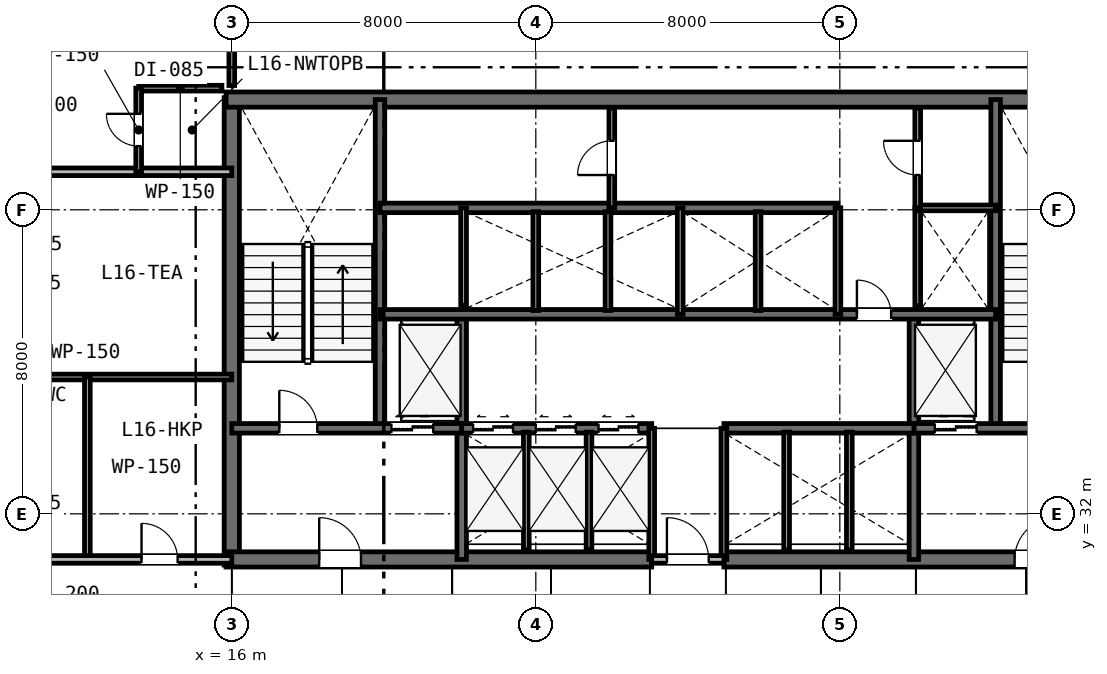
"""IFC4 building model, lengths in metres.
Left out: names, types, materials, properties, quantities, classifications, styles, units other than length and angle.
Written with IfcOpenShell. Run it as: python <this file> out.ifc"""

import sys

from ifc_helpers import new_model, si_unit, direction, frame, frame_2d, origin, place, context, subcontext, project, spatial, rectangle, extrude, element, fill, save


model = new_model("IFC4")
c1 = context("Model", 3, precision=1e-05, world=origin(), true_north=direction((0.0, 1.0)))
c2 = subcontext(c1, "Body", "Model", "MODEL_VIEW")
j1 = project(units=[si_unit("LENGTHUNIT", "METRE"), si_unit("PLANEANGLEUNIT", "RADIAN")], contexts=[c1])
p1 = place(None, origin())
s1 = spatial("IfcSite", under=j1, at=p1, CompositionType="ELEMENT")
p2 = place(p1, origin())
s2 = spatial("IfcBuilding", under=s1, at=p2, CompositionType="ELEMENT")
p3 = place(p2, frame((0.0, 0.0, 65.4)))
s3 = spatial("IfcBuildingStorey", under=s2, at=p3, CompositionType="ELEMENT", Elevation=65.4)
p4 = place(p3, frame((16.0, 30.65, 0.0), z_axis=(0.0, 0.0, 1.0), x_axis=(0.0, 1.0, 0.0)))
e1 = element("IfcWall", 1, at=p4, inside=s3, PredefinedType="SHEAR", context=c2, shape_type="SweptSolid", body=[
    extrude(rectangle(XDim=12.3, YDim=0.4, at=frame_2d((6.15, 0.0))), origin(), (0.0, 0.0, 1.0), 3.6),
])
p5 = place(p3, frame((15.85, 42.9, 0.0), z_axis=(0.0, 0.0, 1.0), x_axis=(1.0, 0.0, 0.0)))
e2 = element("IfcWall", 2, at=p5, inside=s3, PredefinedType="SHEAR", context=c2, shape_type="SweptSolid", body=[
    extrude(rectangle(XDim=24.3, YDim=0.4, at=frame_2d((12.15, 0.0))), origin(), (0.0, 0.0, 1.0), 3.6),
])
p6 = place(p3, frame((15.85, 30.8, 0.0), z_axis=(0.0, 0.0, 1.0), x_axis=(1.0, 0.0, 0.0)))
e3 = element("IfcWall", 3, at=p6, inside=s3, PredefinedType="SHEAR", context=c2, shape_type="SweptSolid", body=[
    extrude(rectangle(XDim=11.2, YDim=0.4, at=frame_2d((5.6, 0.0))), origin(), (0.0, 0.0, 1.0), 3.6),
])
p7 = place(p6, frame((2.45, 0.0, 0.0)))
e4 = element("IfcOpeningElement", 4, at=p7, cuts=e3, PredefinedType="OPENING", context=c2, shape_type="SweptSolid", body=[
    extrude(rectangle(XDim=1.1, YDim=2.15, at=frame_2d((0.55, 1.075))), frame((0.0, 0.21, 0.0), z_axis=(0.0, -1.0, 0.0), x_axis=(1.0, 0.0, 0.0)), (0.0, 0.0, 1.0), 0.42),
])
p8 = place(p3, frame((28.95, 30.8, 0.0), z_axis=(0.0, 0.0, 1.0), x_axis=(1.0, 0.0, 0.0)))
e5 = element("IfcWall", 5, at=p8, inside=s3, PredefinedType="SHEAR", context=c2, shape_type="SweptSolid", body=[
    extrude(rectangle(XDim=11.2, YDim=0.4, at=frame_2d((5.6, 0.0))), origin(), (0.0, 0.0, 1.0), 3.6),
])
p9 = place(p8, frame((7.65, 0.0, 0.0)))
e6 = element("IfcOpeningElement", 6, at=p9, cuts=e5, PredefinedType="OPENING", context=c2, shape_type="SweptSolid", body=[
    extrude(rectangle(XDim=1.1, YDim=2.15, at=frame_2d((0.55, 1.075))), frame((0.0, 0.21, 0.0), z_axis=(0.0, -1.0, 0.0), x_axis=(1.0, 0.0, 0.0)), (0.0, 0.0, 1.0), 0.42),
])
for number, where, z_axis, x_axis in (
    (7, (19.9, 34.25, 0.0), (0.0, 0.0, 1.0), (0.0, 1.0, 0.0)),
    (8, (36.1, 34.25, 0.0), (0.0, 0.0, 1.0), (0.0, 1.0, 0.0)),
):
    element("IfcWall", number, at=place(p3, frame(where, z_axis=z_axis, x_axis=x_axis)), inside=s3, PredefinedType="SHEAR", context=c2, shape_type="SweptSolid", body=[
        extrude(rectangle(XDim=8.65, YDim=0.25, at=frame_2d((4.325, 0.0))), origin(), (0.0, 0.0, 1.0), 3.6),
    ])
for number, where, z_axis, x_axis in (
    (9, (22.05, 30.8, 0.0), (0.0, 0.0, 1.0), (0.0, 1.0, 0.0)),
    (10, (33.95, 30.8, 0.0), (0.0, 0.0, 1.0), (0.0, 1.0, 0.0)),
):
    element("IfcWall", number, at=place(p3, frame(where, z_axis=z_axis, x_axis=x_axis)), inside=s3, PredefinedType="SHEAR", context=c2, shape_type="SweptSolid", body=[
        extrude(rectangle(XDim=6.45, YDim=0.25, at=frame_2d((3.225, 0.0))), origin(), (0.0, 0.0, 1.0), 3.6),
    ])
p10 = place(p3, frame((16.0, 34.25, 0.0), z_axis=(0.0, 0.0, 1.0), x_axis=(1.0, 0.0, 0.0)))
e11 = element("IfcWall", 11, at=p10, inside=s3, PredefinedType="SHEAR", context=c2, shape_type="SweptSolid", body=[
    extrude(rectangle(XDim=6.05, YDim=0.25, at=frame_2d((3.025, 0.0))), origin(), (0.0, 0.0, 1.0), 3.6),
])
p11 = place(p10, frame((1.25, 0.0, 0.0)))
e12 = element("IfcOpeningElement", 12, at=p11, cuts=e11, PredefinedType="OPENING", context=c2, shape_type="SweptSolid", body=[
    extrude(rectangle(XDim=1.0, YDim=2.15, at=frame_2d((0.5, 1.075))), frame((0.0, 0.135, 0.0), z_axis=(0.0, -1.0, 0.0), x_axis=(1.0, 0.0, 0.0)), (0.0, 0.0, 1.0), 0.27),
])
p12 = place(p10, frame((4.2, 0.0, 0.0)))
e13 = element("IfcOpeningElement", 13, at=p12, cuts=e11, PredefinedType="OPENING", context=c2, shape_type="SweptSolid", body=[
    extrude(rectangle(XDim=1.1, YDim=2.15, at=frame_2d((0.55, 1.075))), frame((0.0, 0.135, 0.0), z_axis=(0.0, -1.0, 0.0), x_axis=(1.0, 0.0, 0.0)), (0.0, 0.0, 1.0), 0.27),
])
p13 = place(p3, frame((33.95, 34.25, 0.0), z_axis=(0.0, 0.0, 1.0), x_axis=(1.0, 0.0, 0.0)))
e14 = element("IfcWall", 14, at=p13, inside=s3, PredefinedType="SHEAR", context=c2, shape_type="SweptSolid", body=[
    extrude(rectangle(XDim=6.05, YDim=0.25, at=frame_2d((3.025, 0.0))), origin(), (0.0, 0.0, 1.0), 3.6),
])
p14 = place(p13, frame((3.7, 0.0, 0.0)))
e15 = element("IfcOpeningElement", 15, at=p14, cuts=e14, PredefinedType="OPENING", context=c2, shape_type="SweptSolid", body=[
    extrude(rectangle(XDim=1.0, YDim=2.15, at=frame_2d((0.5, 1.075))), frame((0.0, 0.135, 0.0), z_axis=(0.0, -1.0, 0.0), x_axis=(1.0, 0.0, 0.0)), (0.0, 0.0, 1.0), 0.27),
])
p15 = place(p13, frame((0.55, 0.0, 0.0)))
e16 = element("IfcOpeningElement", 16, at=p15, cuts=e14, PredefinedType="OPENING", context=c2, shape_type="SweptSolid", body=[
    extrude(rectangle(XDim=1.1, YDim=2.15, at=frame_2d((0.55, 1.075))), frame((0.0, 0.135, 0.0), z_axis=(0.0, -1.0, 0.0), x_axis=(1.0, 0.0, 0.0)), (0.0, 0.0, 1.0), 0.27),
])
p16 = place(p3, frame((22.05, 34.25, 0.0), z_axis=(0.0, 0.0, 1.0), x_axis=(1.0, 0.0, 0.0)))
e17 = element("IfcWall", 17, at=p16, inside=s3, PredefinedType="SHEAR", context=c2, shape_type="SweptSolid", body=[
    extrude(rectangle(XDim=5.0, YDim=0.25, at=frame_2d((2.5, 0.0))), origin(), (0.0, 0.0, 1.0), 3.6),
])
p17 = place(p16, frame((0.3, 0.0, 0.0)))
e18 = element("IfcOpeningElement", 18, at=p17, cuts=e17, PredefinedType="OPENING", context=c2, shape_type="SweptSolid", body=[
    extrude(rectangle(XDim=1.05, YDim=2.15, at=frame_2d((0.525, 1.075))), frame((0.0, 0.135, 0.0), z_axis=(0.0, -1.0, 0.0), x_axis=(1.0, 0.0, 0.0)), (0.0, 0.0, 1.0), 0.27),
])
p18 = place(p16, frame((1.95, 0.0, 0.0)))
e19 = element("IfcOpeningElement", 19, at=p18, cuts=e17, PredefinedType="OPENING", context=c2, shape_type="SweptSolid", body=[
    extrude(rectangle(XDim=1.05, YDim=2.15, at=frame_2d((0.525, 1.075))), frame((0.0, 0.135, 0.0), z_axis=(0.0, -1.0, 0.0), x_axis=(1.0, 0.0, 0.0)), (0.0, 0.0, 1.0), 0.27),
])
p19 = place(p16, frame((3.6, 0.0, 0.0)))
e20 = element("IfcOpeningElement", 20, at=p19, cuts=e17, PredefinedType="OPENING", context=c2, shape_type="SweptSolid", body=[
    extrude(rectangle(XDim=1.05, YDim=2.15, at=frame_2d((0.525, 1.075))), frame((0.0, 0.135, 0.0), z_axis=(0.0, -1.0, 0.0), x_axis=(1.0, 0.0, 0.0)), (0.0, 0.0, 1.0), 0.27),
])
p20 = place(p3, frame((28.95, 34.25, 0.0), z_axis=(0.0, 0.0, 1.0), x_axis=(1.0, 0.0, 0.0)))
e21 = element("IfcWall", 21, at=p20, inside=s3, PredefinedType="SHEAR", context=c2, shape_type="SweptSolid", body=[
    extrude(rectangle(XDim=5.0, YDim=0.25, at=frame_2d((2.5, 0.0))), origin(), (0.0, 0.0, 1.0), 3.6),
])
p21 = place(p3, frame((19.9, 37.25, 0.0), z_axis=(0.0, 0.0, 1.0), x_axis=(1.0, 0.0, 0.0)))
e22 = element("IfcWall", 22, at=p21, inside=s3, PredefinedType="SHEAR", context=c2, shape_type="SweptSolid", body=[
    extrude(rectangle(XDim=16.2, YDim=0.25, at=frame_2d((8.1, 0.0))), origin(), (0.0, 0.0, 1.0), 3.6),
])
p22 = place(p21, frame((12.55, 0.0, 0.0)))
e23 = element("IfcOpeningElement", 23, at=p22, cuts=e22, PredefinedType="OPENING", context=c2, shape_type="SweptSolid", body=[
    extrude(rectangle(XDim=0.9, YDim=2.15, at=frame_2d((0.45, 1.075))), frame((0.0, 0.135, 0.0), z_axis=(0.0, -1.0, 0.0), x_axis=(1.0, 0.0, 0.0)), (0.0, 0.0, 1.0), 0.27),
])
p23 = place(p3, frame((19.9, 40.05, 0.0), z_axis=(0.0, 0.0, 1.0), x_axis=(1.0, 0.0, 0.0)))
e24 = element("IfcWall", 24, at=p23, inside=s3, PredefinedType="SHEAR", context=c2, shape_type="SweptSolid", body=[
    extrude(rectangle(XDim=12.05, YDim=0.25, at=frame_2d((6.025, 0.0))), origin(), (0.0, 0.0, 1.0), 3.6),
])
for number, where, z_axis, x_axis in (
    (25, (27.05, 30.8, 0.0), (0.0, 0.0, 1.0), (0.0, 1.0, 0.0)),
    (26, (28.95, 30.8, 0.0), (0.0, 0.0, 1.0), (0.0, 1.0, 0.0)),
):
    element("IfcWall", number, at=place(p3, frame(where, z_axis=z_axis, x_axis=x_axis)), inside=s3, PredefinedType="PLUMBINGWALL", context=c2, shape_type="SweptSolid", body=[
        extrude(rectangle(XDim=3.45, YDim=0.15, at=frame_2d((1.725, 0.0))), origin(), (0.0, 0.0, 1.0), 3.33),
    ])
p24 = place(p3, frame((27.05, 30.8, 0.0), z_axis=(0.0, 0.0, 1.0), x_axis=(1.0, 0.0, 0.0)))
e27 = element("IfcWall", 27, at=p24, inside=s3, PredefinedType="PARTITIONING", context=c2, shape_type="SweptSolid", body=[
    extrude(rectangle(XDim=1.9, YDim=0.2, at=frame_2d((0.95, 0.0))), origin(), (0.0, 0.0, 1.0), 3.33),
])
p25 = place(p24, frame((0.4, 0.0, 0.0)))
e28 = element("IfcOpeningElement", 28, at=p25, cuts=e27, PredefinedType="OPENING", context=c2, shape_type="SweptSolid", body=[
    extrude(rectangle(XDim=1.1, YDim=2.15, at=frame_2d((0.55, 1.075))), frame((0.0, 0.11, 0.0), z_axis=(0.0, -1.0, 0.0), x_axis=(1.0, 0.0, 0.0)), (0.0, 0.0, 1.0), 0.22),
])
for number, where, z_axis, x_axis in (
    (29, (23.75, 31.05, 0.0), (0.0, 0.0, 1.0), (0.0, 1.0, 0.0)),
    (30, (25.4, 31.05, 0.0), (0.0, 0.0, 1.0), (0.0, 1.0, 0.0)),
    (31, (30.6, 31.05, 0.0), (0.0, 0.0, 1.0), (0.0, 1.0, 0.0)),
    (32, (32.25, 31.05, 0.0), (0.0, 0.0, 1.0), (0.0, 1.0, 0.0)),
):
    element("IfcWall", number, at=place(p3, frame(where, z_axis=z_axis, x_axis=x_axis)), inside=s3, PredefinedType="PLUMBINGWALL", context=c2, shape_type="SweptSolid", body=[
        extrude(rectangle(XDim=3.1, YDim=0.15, at=frame_2d((1.55, 0.0))), origin(), (0.0, 0.0, 1.0), 3.33),
    ])
p26 = place(p3, frame((22.1, 37.49, 0.0), z_axis=(0.0, 0.0, 1.0), x_axis=(0.0, 1.0, 0.0)))
e33 = element("IfcWall", 33, at=p26, inside=s3, PredefinedType="PLUMBINGWALL", context=c2, shape_type="SweptSolid", body=[
    extrude(rectangle(XDim=2.56, YDim=0.15, at=frame_2d((1.28, 0.0))), origin(), (0.0, 0.0, 1.0), 3.33),
])
p27 = place(p3, frame((27.8, 37.25, 0.0), z_axis=(0.0, 0.0, 1.0), x_axis=(0.0, 1.0, 0.0)))
e34 = element("IfcWall", 34, at=p27, inside=s3, PredefinedType="PLUMBINGWALL", context=c2, shape_type="SweptSolid", body=[
    extrude(rectangle(XDim=2.8, YDim=0.15, at=frame_2d((1.4, 0.0))), origin(), (0.0, 0.0, 1.0), 3.33),
])
for number, where, z_axis, x_axis in (
    (35, (24.0, 37.35, 0.0), (0.0, 0.0, 1.0), (0.0, 1.0, 0.0)),
    (36, (25.9, 37.35, 0.0), (0.0, 0.0, 1.0), (0.0, 1.0, 0.0)),
):
    element("IfcWall", number, at=place(p3, frame(where, z_axis=z_axis, x_axis=x_axis)), inside=s3, PredefinedType="PLUMBINGWALL", context=c2, shape_type="SweptSolid", body=[
        extrude(rectangle(XDim=2.6, YDim=0.15, at=frame_2d((1.3, 0.0))), origin(), (0.0, 0.0, 1.0), 3.33),
    ])
p28 = place(p3, frame((31.95, 37.25, 0.0), z_axis=(0.0, 0.0, 1.0), x_axis=(0.0, 1.0, 0.0)))
e37 = element("IfcWall", 37, at=p28, inside=s3, PredefinedType="PLUMBINGWALL", context=c2, shape_type="SweptSolid", body=[
    extrude(rectangle(XDim=2.8, YDim=0.15, at=frame_2d((1.4, 0.0))), origin(), (0.0, 0.0, 1.0), 3.33),
])
p29 = place(p3, frame((29.85, 37.35, 0.0), z_axis=(0.0, 0.0, 1.0), x_axis=(0.0, 1.0, 0.0)))
e38 = element("IfcWall", 38, at=p29, inside=s3, PredefinedType="PLUMBINGWALL", context=c2, shape_type="SweptSolid", body=[
    extrude(rectangle(XDim=2.6, YDim=0.15, at=frame_2d((1.3, 0.0))), origin(), (0.0, 0.0, 1.0), 3.33),
])
p30 = place(p3, frame((34.05, 37.473, 0.0), z_axis=(0.0, 0.0, 1.0), x_axis=(0.0, 1.0, 0.0)))
e39 = element("IfcWall", 39, at=p30, inside=s3, PredefinedType="PLUMBINGWALL", context=c2, shape_type="SweptSolid", body=[
    extrude(rectangle(XDim=2.577, YDim=0.15, at=frame_2d((1.288, 0.0))), origin(), (0.0, 0.0, 1.0), 3.33),
])
p31 = place(p3, frame((34.05, 40.05, 0.0), z_axis=(0.0, 0.0, 1.0), x_axis=(1.0, 0.0, 0.0)))
e40 = element("IfcWall", 40, at=p31, inside=s3, PredefinedType="PARTITIONING", context=c2, shape_type="SweptSolid", body=[
    extrude(rectangle(XDim=2.05, YDim=0.15, at=frame_2d((1.025, 0.0))), origin(), (0.0, 0.0, 1.0), 3.33),
])
p32 = place(p3, frame((34.05, 40.05, 0.0), z_axis=(0.0, 0.0, 1.0), x_axis=(0.0, 1.0, 0.0)))
e41 = element("IfcWall", 41, at=p32, inside=s3, PredefinedType="PARTITIONING", context=c2, shape_type="SweptSolid", body=[
    extrude(rectangle(XDim=2.63, YDim=0.15, at=frame_2d((1.315, 0.0))), origin(), (0.0, 0.0, 1.0), 3.33),
])
p33 = place(p32, frame((0.865, 0.0, 0.0)))
e42 = element("IfcOpeningElement", 42, at=p33, cuts=e41, PredefinedType="OPENING", context=c2, shape_type="SweptSolid", body=[
    extrude(rectangle(XDim=0.9, YDim=2.15, at=frame_2d((0.45, 1.075))), frame((0.0, 0.085, 0.0), z_axis=(0.0, -1.0, 0.0), x_axis=(1.0, 0.0, 0.0)), (0.0, 0.0, 1.0), 0.17),
])
p34 = place(p3, frame((26.0, 40.05, 0.0), z_axis=(0.0, 0.0, 1.0), x_axis=(0.0, 1.0, 0.0)))
e43 = element("IfcWall", 43, at=p34, inside=s3, PredefinedType="PARTITIONING", context=c2, shape_type="SweptSolid", body=[
    extrude(rectangle(XDim=2.63, YDim=0.15, at=frame_2d((1.315, 0.0))), origin(), (0.0, 0.0, 1.0), 3.33),
])
p35 = place(p34, frame((0.865, 0.0, 0.0)))
e44 = element("IfcOpeningElement", 44, at=p35, cuts=e43, PredefinedType="OPENING", context=c2, shape_type="SweptSolid", body=[
    extrude(rectangle(XDim=0.9, YDim=2.15, at=frame_2d((0.45, 1.075))), frame((0.0, 0.085, 0.0), z_axis=(0.0, -1.0, 0.0), x_axis=(1.0, 0.0, 0.0)), (0.0, 0.0, 1.0), 0.17),
])
p36 = place(p3, frame((8.3, 35.6, 0.0), z_axis=(0.0, 0.0, 1.0), x_axis=(1.0, 0.0, 0.0)))
e45 = element("IfcWall", 45, at=p36, inside=s3, PredefinedType="PARTITIONING", context=c2, shape_type="SweptSolid", body=[
    extrude(rectangle(XDim=7.7, YDim=0.15, at=frame_2d((3.85, 0.0))), origin(), (0.0, 0.0, 1.0), 2.83),
])
p37 = place(p3, frame((12.2, 30.8, 0.0), z_axis=(0.0, 0.0, 1.0), x_axis=(0.0, 1.0, 0.0)))
e46 = element("IfcWall", 46, at=p37, inside=s3, PredefinedType="PARTITIONING", context=c2, shape_type="SweptSolid", body=[
    extrude(rectangle(XDim=4.8, YDim=0.15, at=frame_2d((2.4, 0.0))), origin(), (0.0, 0.0, 1.0), 2.83),
])
p38 = place(p3, frame((8.3, 30.8, 0.0), z_axis=(0.0, 0.0, 1.0), x_axis=(1.0, 0.0, 0.0)))
e47 = element("IfcWall", 47, at=p38, inside=s3, PredefinedType="PARTITIONING", context=c2, shape_type="SweptSolid", body=[
    extrude(rectangle(XDim=7.7, YDim=0.2, at=frame_2d((3.85, 0.0))), origin(), (0.0, 0.0, 1.0), 2.83),
])
p39 = place(p38, frame((5.325, 0.0, 0.0)))
e48 = element("IfcOpeningElement", 48, at=p39, cuts=e47, PredefinedType="OPENING", context=c2, shape_type="SweptSolid", body=[
    extrude(rectangle(XDim=0.95, YDim=2.15, at=frame_2d((0.475, 1.075))), frame((0.0, 0.11, 0.0), z_axis=(0.0, -1.0, 0.0), x_axis=(1.0, 0.0, 0.0)), (0.0, 0.0, 1.0), 0.22),
])
p40 = place(p3, frame((0.1, 41.0, 0.0), z_axis=(0.0, 0.0, 1.0), x_axis=(1.0, 0.0, 0.0)))
e49 = element("IfcWall", 49, at=p40, inside=s3, PredefinedType="PARTITIONING", context=c2, shape_type="SweptSolid", body=[
    extrude(rectangle(XDim=15.9, YDim=0.2, at=frame_2d((7.95, 0.0))), origin(), (0.0, 0.0, 1.0), 2.83),
])
p41 = place(p40, frame((6.779, 0.0, 0.0)))
e50 = element("IfcOpeningElement", 50, at=p41, cuts=e49, PredefinedType="OPENING", context=c2, shape_type="SweptSolid", body=[
    extrude(rectangle(XDim=0.95, YDim=2.15, at=frame_2d((0.475, 1.075))), frame((0.0, 0.11, 0.0), z_axis=(0.0, -1.0, 0.0), x_axis=(1.0, 0.0, 0.0)), (0.0, 0.0, 1.0), 0.22),
])
p42 = place(p3, frame((13.55, 43.2, 0.0), z_axis=(0.0, 0.0, 1.0), x_axis=(1.0, 0.0, 0.0)))
e51 = element("IfcWall", 51, at=p42, inside=s3, PredefinedType="PARTITIONING", context=c2, shape_type="SweptSolid", body=[
    extrude(rectangle(XDim=2.19, YDim=0.15, at=frame_2d((1.095, 0.0))), origin(), (0.0, 0.0, 1.0), 3.33),
])
p43 = place(p3, frame((13.55, 41.0, 0.0), z_axis=(0.0, 0.0, 1.0), x_axis=(0.0, 1.0, 0.0)))
e52 = element("IfcWall", 52, at=p43, inside=s3, PredefinedType="PARTITIONING", context=c2, shape_type="SweptSolid", body=[
    extrude(rectangle(XDim=2.2, YDim=0.15, at=frame_2d((1.1, 0.0))), origin(), (0.0, 0.0, 1.0), 3.33),
])
p44 = place(p43, frame((0.675, 0.0, 0.0)))
e53 = element("IfcOpeningElement", 53, at=p44, cuts=e52, PredefinedType="OPENING", context=c2, shape_type="SweptSolid", body=[
    extrude(rectangle(XDim=0.85, YDim=2.15, at=frame_2d((0.425, 1.075))), frame((0.0, 0.085, 0.0), z_axis=(0.0, -1.0, 0.0), x_axis=(1.0, 0.0, 0.0)), (0.0, 0.0, 1.0), 0.17),
])
p45 = place(p3, frame((16.0, 43.27, 0.0), z_axis=(0.0, 0.0, 1.0), x_axis=(0.0, 1.0, 0.0)))
e54 = element("IfcWall", 54, at=p45, inside=s3, PredefinedType="PARTITIONING", context=c2, shape_type="SweptSolid", body=[
    extrude(rectangle(XDim=4.63, YDim=0.15, at=frame_2d((2.315, 0.0))), origin(), (0.0, 0.0, 1.0), 2.92),
])
p46 = place(p25, origin())
e55 = element("IfcDoor", 55, at=p46, inside=s3, OperationType="SINGLE_SWING_LEFT", PredefinedType="DOOR", context=c2, shape_type="SweptSolid", body=[
    extrude(rectangle(XDim=1.1, YDim=2.15, at=frame_2d((0.55, 1.075))), frame((0.0, 0.025, 0.0), z_axis=(0.0, -1.0, 0.0), x_axis=(1.0, 0.0, 0.0)), (0.0, 0.0, 1.0), 0.05),
])
fill(e28, e55)
p47 = place(p11, origin())
e56 = element("IfcDoor", 56, at=p47, inside=s3, OperationType="SINGLE_SWING_LEFT", PredefinedType="DOOR", context=c2, shape_type="SweptSolid", body=[
    extrude(rectangle(XDim=1.0, YDim=2.15, at=frame_2d((0.5, 1.075))), frame((0.0, 0.025, 0.0), z_axis=(0.0, -1.0, 0.0), x_axis=(1.0, 0.0, 0.0)), (0.0, 0.0, 1.0), 0.05),
])
fill(e12, e56)
p48 = place(p7, origin())
e57 = element("IfcDoor", 57, at=p48, inside=s3, OperationType="SINGLE_SWING_LEFT", PredefinedType="DOOR", context=c2, shape_type="SweptSolid", body=[
    extrude(rectangle(XDim=1.1, YDim=2.15, at=frame_2d((0.55, 1.075))), frame((0.0, 0.025, 0.0), z_axis=(0.0, -1.0, 0.0), x_axis=(1.0, 0.0, 0.0)), (0.0, 0.0, 1.0), 0.05),
])
fill(e4, e57)
p49 = place(p9, origin())
e58 = element("IfcDoor", 58, at=p49, inside=s3, OperationType="SINGLE_SWING_RIGHT", PredefinedType="DOOR", context=c2, shape_type="SweptSolid", body=[
    extrude(rectangle(XDim=1.1, YDim=2.15, at=frame_2d((0.55, 1.075))), frame((0.0, 0.025, 0.0), z_axis=(0.0, -1.0, 0.0), x_axis=(1.0, 0.0, 0.0)), (0.0, 0.0, 1.0), 0.05),
])
fill(e6, e58)
p50 = place(p22, origin())
e59 = element("IfcDoor", 59, at=p50, inside=s3, OperationType="SINGLE_SWING_LEFT", PredefinedType="DOOR", context=c2, shape_type="SweptSolid", body=[
    extrude(rectangle(XDim=0.9, YDim=2.15, at=frame_2d((0.45, 1.075))), frame((0.0, 0.025, 0.0), z_axis=(0.0, -1.0, 0.0), x_axis=(1.0, 0.0, 0.0)), (0.0, 0.0, 1.0), 0.05),
])
fill(e23, e59)
p51 = place(p33, origin())
e60 = element("IfcDoor", 60, at=p51, inside=s3, OperationType="SINGLE_SWING_RIGHT", PredefinedType="DOOR", context=c2, shape_type="SweptSolid", body=[
    extrude(rectangle(XDim=0.9, YDim=2.15, at=frame_2d((0.45, 1.075))), frame((0.0, 0.025, 0.0), z_axis=(0.0, -1.0, 0.0), x_axis=(1.0, 0.0, 0.0)), (0.0, 0.0, 1.0), 0.05),
])
fill(e42, e60)
p52 = place(p35, origin())
e61 = element("IfcDoor", 61, at=p52, inside=s3, OperationType="SINGLE_SWING_LEFT", PredefinedType="DOOR", context=c2, shape_type="SweptSolid", body=[
    extrude(rectangle(XDim=0.9, YDim=2.15, at=frame_2d((0.45, 1.075))), frame((0.0, 0.025, 0.0), z_axis=(0.0, -1.0, 0.0), x_axis=(1.0, 0.0, 0.0)), (0.0, 0.0, 1.0), 0.05),
])
fill(e44, e61)
p53 = place(p39, origin())
e62 = element("IfcDoor", 62, at=p53, inside=s3, OperationType="SINGLE_SWING_LEFT", PredefinedType="DOOR", context=c2, shape_type="SweptSolid", body=[
    extrude(rectangle(XDim=0.95, YDim=2.15, at=frame_2d((0.475, 1.075))), frame((0.0, 0.025, 0.0), z_axis=(0.0, -1.0, 0.0), x_axis=(1.0, 0.0, 0.0)), (0.0, 0.0, 1.0), 0.05),
])
fill(e48, e62)
p54 = place(p44, origin())
e63 = element("IfcDoor", 63, at=p54, inside=s3, OperationType="SINGLE_SWING_RIGHT", PredefinedType="DOOR", context=c2, shape_type="SweptSolid", body=[
    extrude(rectangle(XDim=0.85, YDim=2.15, at=frame_2d((0.425, 1.075))), frame((0.0, 0.025, 0.0), z_axis=(0.0, -1.0, 0.0), x_axis=(1.0, 0.0, 0.0)), (0.0, 0.0, 1.0), 0.05),
])
fill(e53, e63)
p55 = place(p12, origin())
e64 = element("IfcDoor", 64, at=p55, inside=s3, OperationType="DOUBLE_DOOR_SLIDING", PredefinedType="DOOR", context=c2, shape_type="SweptSolid", body=[
    extrude(rectangle(XDim=1.1, YDim=2.15, at=frame_2d((0.55, 1.075))), frame((0.0, 0.025, 0.0), z_axis=(0.0, -1.0, 0.0), x_axis=(1.0, 0.0, 0.0)), (0.0, 0.0, 1.0), 0.05),
])
fill(e13, e64)
p56 = place(p15, origin())
e65 = element("IfcDoor", 65, at=p56, inside=s3, OperationType="DOUBLE_DOOR_SLIDING", PredefinedType="DOOR", context=c2, shape_type="SweptSolid", body=[
    extrude(rectangle(XDim=1.1, YDim=2.15, at=frame_2d((0.55, 1.075))), frame((0.0, 0.025, 0.0), z_axis=(0.0, -1.0, 0.0), x_axis=(1.0, 0.0, 0.0)), (0.0, 0.0, 1.0), 0.05),
])
fill(e16, e65)
p57 = place(p17, origin())
e66 = element("IfcDoor", 66, at=p57, inside=s3, OperationType="DOUBLE_DOOR_SLIDING", PredefinedType="DOOR", context=c2, shape_type="SweptSolid", body=[
    extrude(rectangle(XDim=1.05, YDim=2.15, at=frame_2d((0.525, 1.075))), frame((0.0, 0.025, 0.0), z_axis=(0.0, -1.0, 0.0), x_axis=(1.0, 0.0, 0.0)), (0.0, 0.0, 1.0), 0.05),
])
fill(e18, e66)
p58 = place(p18, origin())
e67 = element("IfcDoor", 67, at=p58, inside=s3, OperationType="DOUBLE_DOOR_SLIDING", PredefinedType="DOOR", context=c2, shape_type="SweptSolid", body=[
    extrude(rectangle(XDim=1.05, YDim=2.15, at=frame_2d((0.525, 1.075))), frame((0.0, 0.025, 0.0), z_axis=(0.0, -1.0, 0.0), x_axis=(1.0, 0.0, 0.0)), (0.0, 0.0, 1.0), 0.05),
])
fill(e19, e67)
p59 = place(p19, origin())
e68 = element("IfcDoor", 68, at=p59, inside=s3, OperationType="DOUBLE_DOOR_SLIDING", PredefinedType="DOOR", context=c2, shape_type="SweptSolid", body=[
    extrude(rectangle(XDim=1.05, YDim=2.15, at=frame_2d((0.525, 1.075))), frame((0.0, 0.025, 0.0), z_axis=(0.0, -1.0, 0.0), x_axis=(1.0, 0.0, 0.0)), (0.0, 0.0, 1.0), 0.05),
])
fill(e20, e68)
save(model, sys.argv[1])
